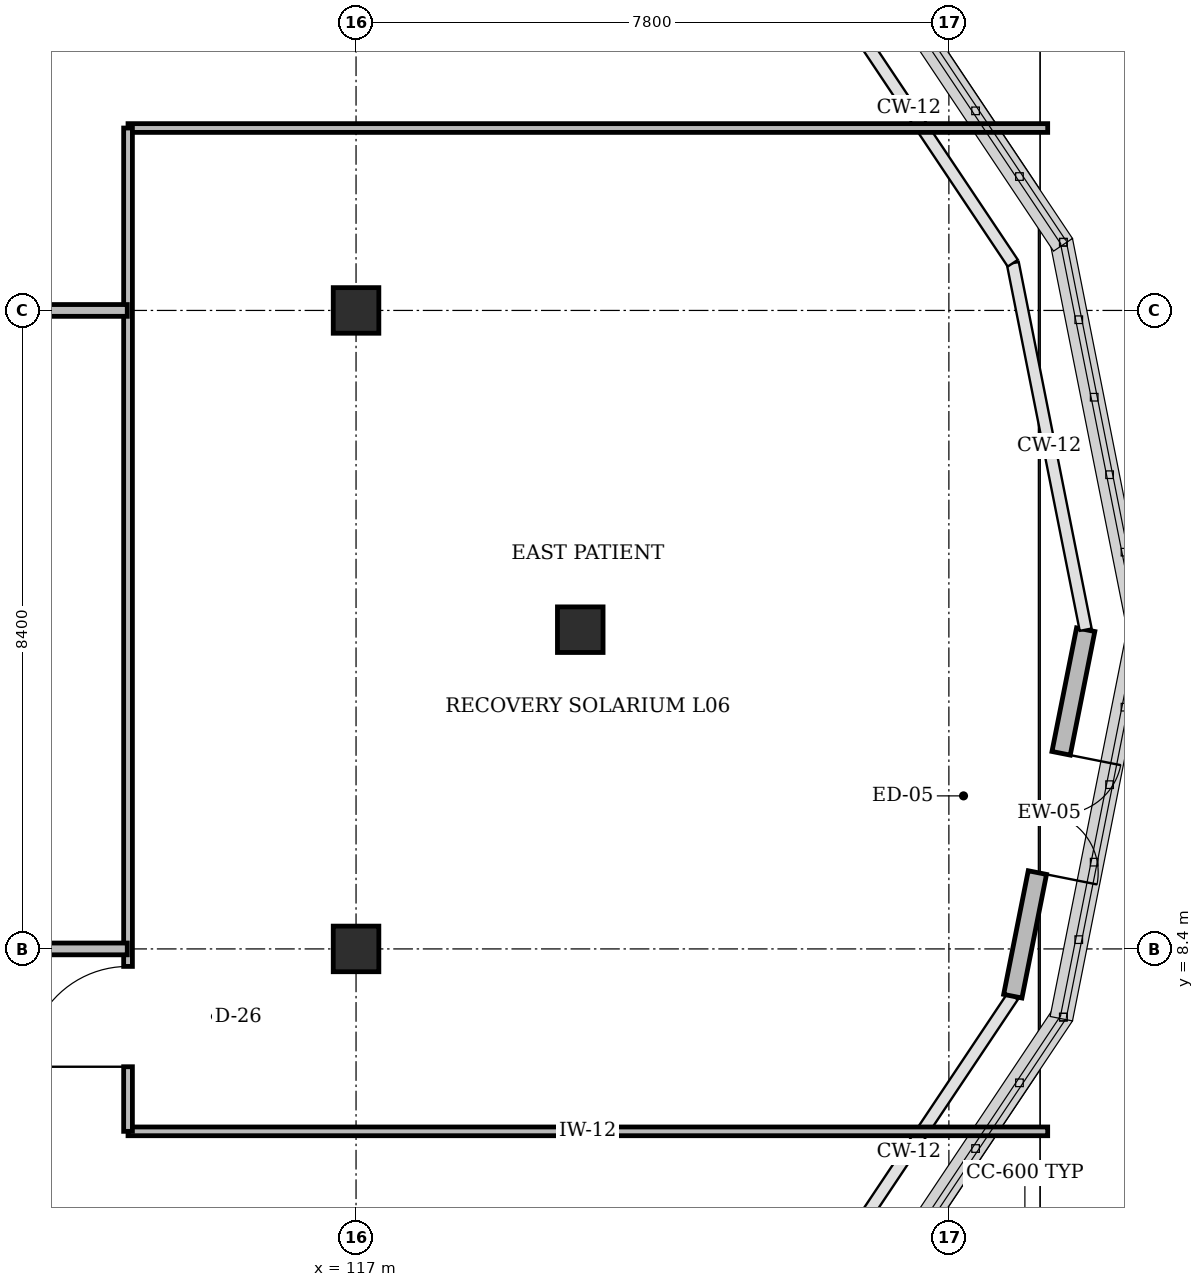
"""IFC4 building model, lengths in metres.
Left out: names, types, materials, properties, quantities, classifications, styles, units other than length and angle.
Written with IfcOpenShell. Run it as: python <this file> out.ifc"""

import sys

from ifc_helpers import new_model, si_unit, direction, frame, frame_2d, origin, origin_2d, place, context, subcontext, project, spatial, rectangle, circle, extrude, element, fill, save


model = new_model("IFC4")
c1 = context("Model", 3, precision=1e-05, world=origin(), true_north=direction((0.0, 1.0)))
c2 = subcontext(c1, "Body", "Model", "MODEL_VIEW")
j1 = project(units=[si_unit("LENGTHUNIT", "METRE"), si_unit("PLANEANGLEUNIT", "RADIAN")], contexts=[c1])
p1 = place(None, origin())
s1 = spatial("IfcSite", under=j1, at=p1, CompositionType="ELEMENT")
p2 = place(p1, origin())
s2 = spatial("IfcBuilding", under=s1, at=p2, CompositionType="ELEMENT")
p3 = place(p2, frame((0.0, 0.0, 26.4)))
s3 = spatial("IfcBuildingStorey", under=s2, at=p3, CompositionType="ELEMENT", Elevation=26.4)
for number, where, z_axis, x_axis in (
    (1, (117.0, 8.4, 0.0), (0.0, 0.0, 1.0), (1.0, 0.0, 0.0)),
    (2, (117.0, 16.8, 0.0), (0.0, 0.0, 1.0), (1.0, 0.0, 0.0)),
):
    element("IfcColumn", number, at=place(p3, frame(where, z_axis=z_axis, x_axis=x_axis)), inside=s3, PredefinedType="COLUMN", context=c2, shape_type="SweptSolid", body=[
        extrude(rectangle(XDim=0.6, YDim=0.6, at=origin_2d()), origin(), (0.0, 0.0, 1.0), 4.2),
    ])
p4 = place(p3, frame((119.95, 12.6, 0.0), z_axis=(0.0, 0.0, 1.0), x_axis=(1.0, 0.0, 0.0)))
e3 = element("IfcColumn", 3, at=p4, inside=s3, PredefinedType="PILASTER", context=c2, shape_type="SweptSolid", body=[
    extrude(circle(Radius=0.3, at=origin_2d()), origin(), (0.0, 0.0, 1.0), 3.95),
])
p5 = place(p3, frame((126.6, 12.6, 0.0), z_axis=(0.0, 0.0, 1.0), x_axis=(-0.195113286981, -0.980780712108, 0.0)))
e4 = element("IfcWall", 4, at=p5, inside=s3, PredefinedType="STANDARD", context=c2, shape_type="SweptSolid", body=[
    extrude(rectangle(XDim=4.916, YDim=0.245, at=frame_2d((2.458, 0.0))), origin(), (0.0, 0.0, 1.0), 3.27),
])
p6 = place(p5, frame((1.658, 0.0, 0.0)))
e5 = element("IfcOpeningElement", 5, at=p6, cuts=e4, PredefinedType="OPENING", context=c2, shape_type="SweptSolid", body=[
    extrude(rectangle(XDim=1.6, YDim=2.2, at=frame_2d((0.8, 1.1))), frame((0.0, 0.133, 0.0), z_axis=(0.0, -1.0, 0.0), x_axis=(1.0, 0.0, 0.0)), (0.0, 0.0, 1.0), 0.265),
])
for number, where, z_axis, x_axis in (
    (6, (114.0, 6.0, 0.0), (0.0, 0.0, 1.0), (1.0, 0.0, 0.0)),
    (7, (114.0, 19.2, 0.0), (0.0, 0.0, 1.0), (1.0, 0.0, 0.0)),
):
    element("IfcWall", number, at=place(p3, frame(where, z_axis=z_axis, x_axis=x_axis)), inside=s3, PredefinedType="PARTITIONING", context=c2, shape_type="SweptSolid", body=[
        extrude(rectangle(XDim=12.1, YDim=0.115, at=frame_2d((6.05, 0.0))), origin(), (0.0, 0.0, 1.0), 3.9),
    ])
p7 = place(p3, frame((114.0, 6.0, 0.0), z_axis=(0.0, 0.0, 1.0), x_axis=(0.0, 1.0, 0.0)))
e8 = element("IfcWall", 8, at=p7, inside=s3, PredefinedType="PARTITIONING", context=c2, shape_type="SweptSolid", body=[
    extrude(rectangle(XDim=13.2, YDim=0.115, at=frame_2d((6.6, 0.0))), origin(), (0.0, 0.0, 1.0), 3.9),
])
p8 = place(p7, frame((0.85, 0.0, 0.0)))
e9 = element("IfcOpeningElement", 9, at=p8, cuts=e8, PredefinedType="OPENING", context=c2, shape_type="SweptSolid", body=[
    extrude(rectangle(XDim=1.32, YDim=2.15, at=frame_2d((0.66, 1.075))), frame((0.0, 0.067, 0.0), z_axis=(0.0, -1.0, 0.0), x_axis=(1.0, 0.0, 0.0)), (0.0, 0.0, 1.0), 0.135),
])
p9 = place(p3, frame((101.96, 8.4, 0.0), z_axis=(0.0, 0.0, 1.0), x_axis=(1.0, 0.0, 0.0)))
e10 = element("IfcWall", 10, at=p9, inside=s3, PredefinedType="PARTITIONING", context=c2, shape_type="SweptSolid", body=[
    extrude(rectangle(XDim=12.03, YDim=0.155, at=frame_2d((6.015, 0.0))), origin(), (0.0, 0.0, 1.0), 3.27),
])
p10 = place(p9, frame((4.112, 0.0, 0.0)))
e11 = element("IfcOpeningElement", 11, at=p10, cuts=e10, PredefinedType="OPENING", context=c2, shape_type="SweptSolid", body=[
    extrude(rectangle(XDim=1.4, YDim=2.2, at=frame_2d((0.7, 1.1))), frame((0.0, 0.087, 0.0), z_axis=(0.0, -1.0, 0.0), x_axis=(1.0, 0.0, 0.0)), (0.0, 0.0, 1.0), 0.175),
])
p11 = place(p3, frame((101.96, 16.8, 0.0), z_axis=(0.0, 0.0, 1.0), x_axis=(1.0, 0.0, 0.0)))
e12 = element("IfcWall", 12, at=p11, inside=s3, PredefinedType="PARTITIONING", context=c2, shape_type="SweptSolid", body=[
    extrude(rectangle(XDim=12.03, YDim=0.155, at=frame_2d((6.015, 0.0))), origin(), (0.0, 0.0, 1.0), 3.27),
])
p12 = place(p6, origin())
e13 = element("IfcDoor", 13, at=p12, inside=s3, OperationType="DOUBLE_DOOR_SINGLE_SWING", PredefinedType="DOOR", context=c2, shape_type="SweptSolid", body=[
    extrude(rectangle(XDim=1.6, YDim=2.2, at=frame_2d((0.8, 1.1))), frame((0.0, 0.025, 0.0), z_axis=(0.0, -1.0, 0.0), x_axis=(1.0, 0.0, 0.0)), (0.0, 0.0, 1.0), 0.05),
])
fill(e5, e13)
p13 = place(p8, origin())
e14 = element("IfcDoor", 14, at=p13, inside=s3, OperationType="SINGLE_SWING_LEFT", PredefinedType="DOOR", context=c2, shape_type="SweptSolid", body=[
    extrude(rectangle(XDim=1.32, YDim=2.15, at=frame_2d((0.66, 1.075))), frame((0.0, 0.025, 0.0), z_axis=(0.0, -1.0, 0.0), x_axis=(1.0, 0.0, 0.0)), (0.0, 0.0, 1.0), 0.05),
])
fill(e9, e14)
save(model, sys.argv[1])
